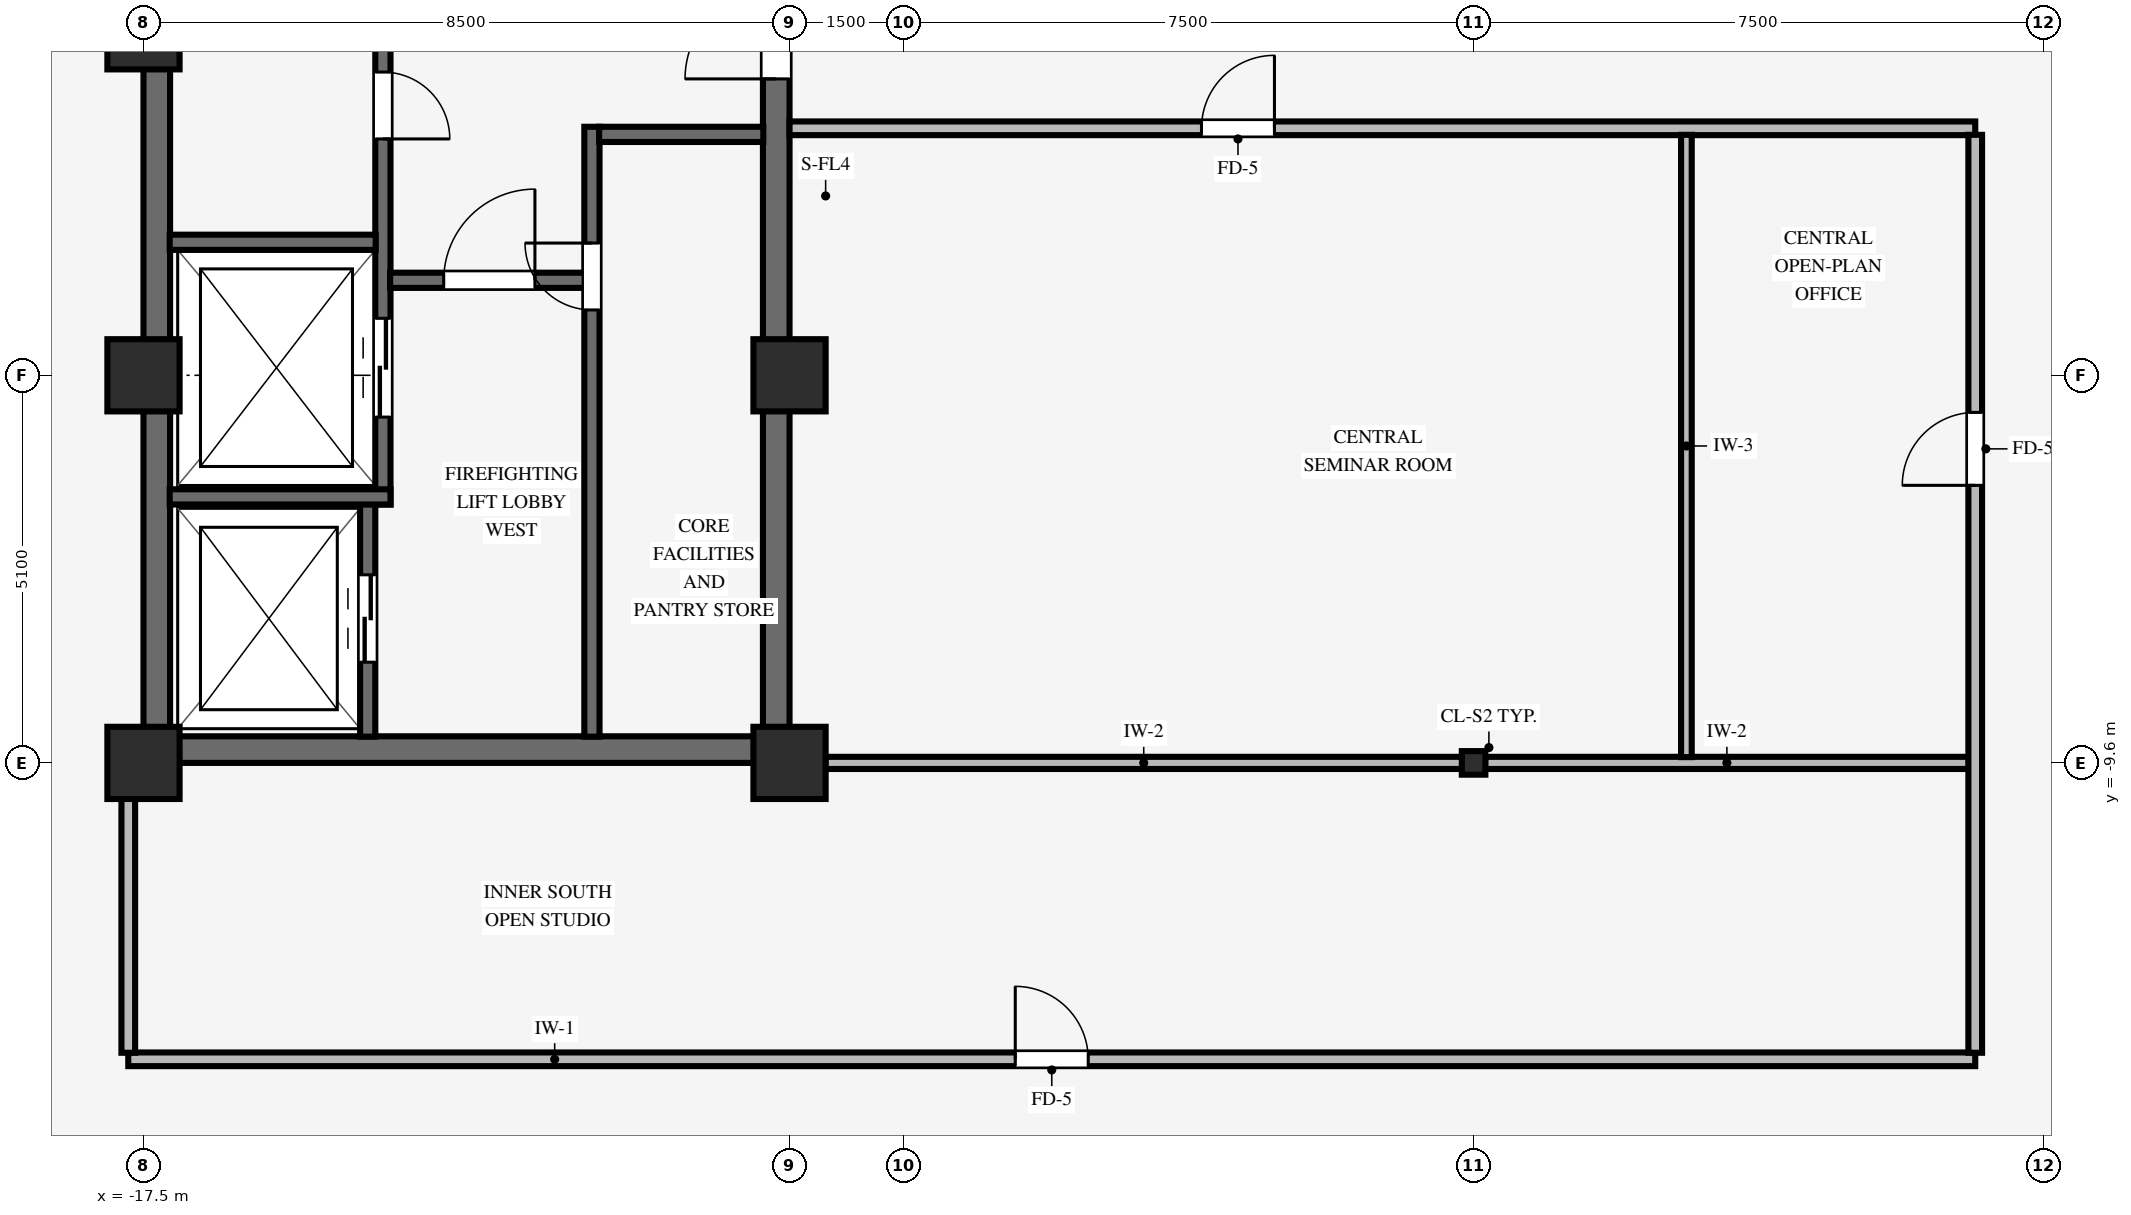
"""IFC4 building model, lengths in metres.
Left out: names, types, materials, properties, quantities, classifications, styles, units other than length and angle.
Written with IfcOpenShell. Run it as: python <this file> out.ifc"""

import sys

from ifc_helpers import new_model, si_unit, direction, frame, frame_2d, origin, origin_2d, place, context, subcontext, project, spatial, rectangle, i_section, extrude, source, transform, mapped, element, fill, save


model = new_model("IFC4")
c1 = context("Model", 3, precision=1e-05, world=origin(), true_north=direction((0.0, 1.0)))
c2 = subcontext(c1, "Body", "Model", "MODEL_VIEW")
j1 = project(units=[si_unit("LENGTHUNIT", "METRE"), si_unit("PLANEANGLEUNIT", "RADIAN")], contexts=[c1])
p1 = place(None, origin())
s1 = spatial("IfcSite", under=j1, at=p1, CompositionType="ELEMENT")
p2 = place(p1, origin())
s2 = spatial("IfcBuilding", under=s1, at=p2, CompositionType="ELEMENT")
p3 = place(p2, frame((0.0, 0.0, 198.2)))
s3 = spatial("IfcBuildingStorey", under=s2, at=p3, CompositionType="ELEMENT", Elevation=198.2)
p4 = place(p3, frame((-17.5, -9.425, 0.0), z_axis=(0.0, 0.0, 1.0), x_axis=(1.0, 0.0, 0.0)))
e1 = element("IfcWall", 1, at=p4, inside=s3, PredefinedType="SHEAR", context=c2, shape_type="SweptSolid", body=[
    extrude(rectangle(XDim=8.5, YDim=0.35, at=frame_2d((4.25, 0.0))), origin(), (0.0, 0.0, 1.0), 3.37),
])
p5 = place(p3, frame((-17.325, -9.255, 0.0), z_axis=(0.0, 0.0, 1.0), x_axis=(0.0, 1.0, 0.0)))
e2 = element("IfcWall", 2, at=p5, inside=s3, PredefinedType="SHEAR", context=c2, shape_type="SweptSolid", body=[
    extrude(rectangle(XDim=18.51, YDim=0.35, at=frame_2d((9.255, 0.0))), origin(), (0.0, 0.0, 1.0), 3.37),
])
p6 = place(p3, frame((-9.175, -9.255, 0.0), z_axis=(0.0, 0.0, 1.0), x_axis=(0.0, 1.0, 0.0)))
e3 = element("IfcWall", 3, at=p6, inside=s3, PredefinedType="SHEAR", context=c2, shape_type="SweptSolid", body=[
    extrude(rectangle(XDim=18.51, YDim=0.35, at=frame_2d((9.255, 0.0))), origin(), (0.0, 0.0, 1.0), 3.37),
])
p7 = place(p6, frame((8.655, 0.0, 0.0)))
e4 = element("IfcOpeningElement", 4, at=p7, cuts=e3, PredefinedType="OPENING", context=c2, shape_type="SweptSolid", body=[
    extrude(rectangle(XDim=1.2, YDim=2.15, at=frame_2d((0.6, 1.075))), frame((0.0, 0.185, 0.0), z_axis=(0.0, -1.0, 0.0), x_axis=(1.0, 0.0, 0.0)), (0.0, 0.0, 1.0), 0.37),
])
for number, where, z_axis, x_axis in (
    (5, (-17.5, -9.6, 0.0), (0.0, 0.0, 1.0), (1.0, 0.0, 0.0)),
    (6, (-17.5, -4.5, 0.0), (0.0, 0.0, 1.0), (1.0, 0.0, 0.0)),
    (7, (-9.0, -9.6, 0.0), (0.0, 0.0, 1.0), (1.0, 0.0, 0.0)),
    (8, (-9.0, -4.5, 0.0), (0.0, 0.0, 1.0), (1.0, 0.0, 0.0)),
    (9, (-17.5, 0.0, 0.0), (0.0, 0.0, 1.0), (1.0, 0.0, 0.0)),
):
    element("IfcColumn", number, at=place(p3, frame(where, z_axis=z_axis, x_axis=x_axis)), inside=s3, PredefinedType="COLUMN", context=c2, shape_type="SweptSolid", body=[
        extrude(rectangle(XDim=0.95, YDim=0.95, at=origin_2d()), origin(), (0.0, 0.0, 1.0), 3.37),
    ])
p8 = place(p3, frame((0.0, -9.6, 0.0), z_axis=(0.0, 0.0, 1.0), x_axis=(1.0, 0.0, 0.0)))
e10 = element("IfcColumn", 10, at=p8, inside=s3, PredefinedType="COLUMN", context=c2, shape_type="SweptSolid", body=[
    extrude(i_section(OverallWidth=0.31, OverallDepth=0.31, WebThickness=0.015, FlangeThickness=0.015, FilletRadius=0.015, at=origin_2d()), origin(), (0.0, 0.0, 1.0), 3.37),
])
p9 = place(p3, frame((-14.55, -9.255, 0.0), z_axis=(0.0, 0.0, 1.0), x_axis=(0.0, 1.0, 0.0)))
e11 = element("IfcWall", 11, at=p9, inside=s3, PredefinedType="SHEAR", context=c2, shape_type="SweptSolid", body=[
    extrude(rectangle(XDim=3.06, YDim=0.2, at=frame_2d((1.53, 0.0))), origin(), (0.0, 0.0, 1.0), 3.37),
])
p10 = place(p9, frame((0.98, 0.0, 0.0)))
e12 = element("IfcOpeningElement", 12, at=p10, cuts=e11, PredefinedType="OPENING", context=c2, shape_type="SweptSolid", body=[
    extrude(rectangle(XDim=1.15, YDim=2.15, at=frame_2d((0.575, 1.075))), frame((0.0, 0.11, 0.0), z_axis=(0.0, -1.0, 0.0), x_axis=(1.0, 0.0, 0.0)), (0.0, 0.0, 1.0), 0.22),
])
p11 = place(p3, frame((-14.35, -6.2, 0.0), z_axis=(0.0, 0.0, 1.0), x_axis=(0.0, 1.0, 0.0)))
e13 = element("IfcWall", 13, at=p11, inside=s3, PredefinedType="SHEAR", context=c2, shape_type="SweptSolid", body=[
    extrude(rectangle(XDim=7.105, YDim=0.2, at=frame_2d((3.552, 0.0))), origin(), (0.0, 0.0, 1.0), 3.37),
])
p12 = place(p11, frame((5.69, 0.0, 0.0), z_axis=(0.0, 0.0, 1.0), x_axis=(-1.0, 0.0, 0.0)))
e14 = element("IfcOpeningElement", 14, at=p12, cuts=e13, PredefinedType="OPENING", context=c2, shape_type="SweptSolid", body=[
    extrude(rectangle(XDim=0.88, YDim=2.1, at=frame_2d((0.44, 1.05))), frame((0.0, 0.11, 0.0), z_axis=(0.0, -1.0, 0.0), x_axis=(1.0, 0.0, 0.0)), (0.0, 0.0, 1.0), 0.22),
])
p13 = place(p11, frame((1.15, 0.0, 0.0)))
e15 = element("IfcOpeningElement", 15, at=p13, cuts=e13, PredefinedType="OPENING", context=c2, shape_type="SweptSolid", body=[
    extrude(rectangle(XDim=1.3, YDim=2.2, at=frame_2d((0.65, 1.1))), frame((0.0, 0.11, 0.0), z_axis=(0.0, -1.0, 0.0), x_axis=(1.0, 0.0, 0.0)), (0.0, 0.0, 1.0), 0.22),
])
p14 = place(p3, frame((-17.155, -6.1, 0.0), z_axis=(0.0, 0.0, 1.0), x_axis=(1.0, 0.0, 0.0)))
e16 = element("IfcWall", 16, at=p14, inside=s3, PredefinedType="SHEAR", context=c2, shape_type="SweptSolid", body=[
    extrude(rectangle(XDim=2.905, YDim=0.2, at=frame_2d((1.453, 0.0))), origin(), (0.0, 0.0, 1.0), 3.37),
])
p15 = place(p3, frame((-17.155, -2.75, 0.0), z_axis=(0.0, 0.0, 1.0), x_axis=(1.0, 0.0, 0.0)))
e17 = element("IfcWall", 17, at=p15, inside=s3, PredefinedType="SHEAR", context=c2, shape_type="SweptSolid", body=[
    extrude(rectangle(XDim=2.71, YDim=0.2, at=frame_2d((1.355, 0.0))), origin(), (0.0, 0.0, 1.0), 3.37),
])
p16 = place(p3, frame((-11.6, -9.255, 0.0), z_axis=(0.0, 0.0, 1.0), x_axis=(0.0, 1.0, 0.0)))
e18 = element("IfcWall", 18, at=p16, inside=s3, PredefinedType="SHEAR", context=c2, shape_type="SweptSolid", body=[
    extrude(rectangle(XDim=8.025, YDim=0.2, at=frame_2d((4.012, 0.0))), origin(), (0.0, 0.0, 1.0), 3.37),
])
p17 = place(p16, frame((5.615, 0.0, 0.0)))
e19 = element("IfcOpeningElement", 19, at=p17, cuts=e18, PredefinedType="OPENING", context=c2, shape_type="SweptSolid", body=[
    extrude(rectangle(XDim=0.88, YDim=2.1, at=frame_2d((0.44, 1.05))), frame((0.0, 0.11, 0.0), z_axis=(0.0, -1.0, 0.0), x_axis=(1.0, 0.0, 0.0)), (0.0, 0.0, 1.0), 0.22),
])
p18 = place(p3, frame((-14.255, -3.25, 0.0), z_axis=(0.0, 0.0, 1.0), x_axis=(1.0, 0.0, 0.0)))
e20 = element("IfcWall", 20, at=p18, inside=s3, PredefinedType="SHEAR", context=c2, shape_type="SweptSolid", body=[
    extrude(rectangle(XDim=2.56, YDim=0.2, at=frame_2d((1.28, 0.0))), origin(), (0.0, 0.0, 1.0), 3.37),
])
p19 = place(p18, frame((0.705, 0.0, 0.0)))
e21 = element("IfcOpeningElement", 21, at=p19, cuts=e20, PredefinedType="OPENING", context=c2, shape_type="SweptSolid", body=[
    extrude(rectangle(XDim=1.2, YDim=2.15, at=frame_2d((0.6, 1.075))), frame((0.0, 0.11, 0.0), z_axis=(0.0, -1.0, 0.0), x_axis=(1.0, 0.0, 0.0)), (0.0, 0.0, 1.0), 0.22),
])
p20 = place(p3, frame((-11.505, -1.33, 0.0), z_axis=(0.0, 0.0, 1.0), x_axis=(1.0, 0.0, 0.0)))
e22 = element("IfcWall", 22, at=p20, inside=s3, PredefinedType="SHEAR", context=c2, shape_type="SweptSolid", body=[
    extrude(rectangle(XDim=2.16, YDim=0.2, at=frame_2d((1.08, 0.0))), origin(), (0.0, 0.0, 1.0), 3.37),
])
p21 = place(p3, frame((-17.7, -13.5, 0.0), z_axis=(0.0, 0.0, 1.0), x_axis=(1.0, 0.0, 0.0)))
e23 = element("IfcWall", 23, at=p21, inside=s3, PredefinedType="PARTITIONING", context=c2, shape_type="SweptSolid", body=[
    extrude(rectangle(XDim=24.3, YDim=0.18, at=frame_2d((12.15, 0.0))), origin(), (0.0, 0.0, 1.0), 3.008),
])
p22 = place(p21, frame((11.67, 0.0, 0.0)))
e24 = element("IfcOpeningElement", 24, at=p22, cuts=e23, PredefinedType="OPENING", context=c2, shape_type="SweptSolid", body=[
    extrude(rectangle(XDim=0.96, YDim=2.1, at=frame_2d((0.48, 1.05))), frame((0.0, 0.1, 0.0), z_axis=(0.0, -1.0, 0.0), x_axis=(1.0, 0.0, 0.0)), (0.0, 0.0, 1.0), 0.2),
])
p23 = place(p3, frame((-8.529, -9.6, 0.0), z_axis=(0.0, 0.0, 1.0), x_axis=(1.0, 0.0, 0.0)))
e25 = element("IfcWall", 25, at=p23, inside=s3, PredefinedType="PARTITIONING", context=c2, shape_type="SweptSolid", body=[
    extrude(rectangle(XDim=8.378, YDim=0.16, at=frame_2d((4.189, 0.0))), origin(), (0.0, 0.0, 1.0), 2.405),
])
p24 = place(p3, frame((0.151, -9.6, 0.0), z_axis=(0.0, 0.0, 1.0), x_axis=(1.0, 0.0, 0.0)))
e26 = element("IfcWall", 26, at=p24, inside=s3, PredefinedType="PARTITIONING", context=c2, shape_type="SweptSolid", body=[
    extrude(rectangle(XDim=6.363, YDim=0.16, at=frame_2d((3.182, 0.0))), origin(), (0.0, 0.0, 1.0), 2.405),
])
p25 = place(p3, frame((-9.0, -1.25, 0.0), z_axis=(0.0, 0.0, 1.0), x_axis=(1.0, 0.0, 0.0)))
e27 = element("IfcWall", 27, at=p25, inside=s3, PredefinedType="PARTITIONING", context=c2, shape_type="SweptSolid", body=[
    extrude(rectangle(XDim=15.6, YDim=0.18, at=frame_2d((7.8, 0.0))), origin(), (0.0, 0.0, 1.0), 3.36),
])
p26 = place(p25, frame((5.42, 0.0, 0.0)))
e28 = element("IfcOpeningElement", 28, at=p26, cuts=e27, PredefinedType="OPENING", context=c2, shape_type="SweptSolid", body=[
    extrude(rectangle(XDim=0.96, YDim=2.1, at=frame_2d((0.48, 1.05))), frame((0.0, 0.1, 0.0), z_axis=(0.0, -1.0, 0.0), x_axis=(1.0, 0.0, 0.0)), (0.0, 0.0, 1.0), 0.2),
])
p27 = place(p3, frame((-17.7, -13.414, 0.0), z_axis=(0.0, 0.0, 1.0), x_axis=(0.0, 1.0, 0.0)))
e29 = element("IfcWall", 29, at=p27, inside=s3, PredefinedType="PARTITIONING", context=c2, shape_type="SweptSolid", body=[
    extrude(rectangle(XDim=3.343, YDim=0.18, at=frame_2d((1.671, 0.0))), origin(), (0.0, 0.0, 1.0), 2.816),
])
p28 = place(p3, frame((2.8, -9.524, 0.0), z_axis=(0.0, 0.0, 1.0), x_axis=(0.0, 1.0, 0.0)))
e30 = element("IfcWall", 30, at=p28, inside=s3, PredefinedType="PARTITIONING", context=c2, shape_type="SweptSolid", body=[
    extrude(rectangle(XDim=8.188, YDim=0.14, at=frame_2d((4.094, 0.0))), origin(), (0.0, 0.0, 1.0), 3.36),
])
p29 = place(p3, frame((6.6, -13.414, 0.0), z_axis=(0.0, 0.0, 1.0), x_axis=(0.0, 1.0, 0.0)))
e31 = element("IfcWall", 31, at=p29, inside=s3, PredefinedType="PARTITIONING", context=c2, shape_type="SweptSolid", body=[
    extrude(rectangle(XDim=12.078, YDim=0.18, at=frame_2d((6.039, 0.0))), origin(), (0.0, 0.0, 1.0), 3.36),
])
p30 = place(p29, frame((7.466, 0.0, 0.0)))
e32 = element("IfcOpeningElement", 32, at=p30, cuts=e31, PredefinedType="OPENING", context=c2, shape_type="SweptSolid", body=[
    extrude(rectangle(XDim=0.96, YDim=2.1, at=frame_2d((0.48, 1.05))), frame((0.0, 0.1, 0.0), z_axis=(0.0, -1.0, 0.0), x_axis=(1.0, 0.0, 0.0)), (0.0, 0.0, 1.0), 0.2),
])
m1 = source(origin(), c2, "Body", "SweptSolid", [
    extrude(rectangle(XDim=0.88, YDim=2.1, at=frame_2d((0.44, 1.05))), frame((0.0, 0.025, 0.0), z_axis=(0.0, -1.0, 0.0), x_axis=(1.0, 0.0, 0.0)), (0.0, 0.0, 1.0), 0.05),
])
p31 = place(p12, origin())
e33 = element("IfcDoor", 33, at=p31, inside=s3, OperationType="SINGLE_SWING_RIGHT", PredefinedType="DOOR", context=c2, shape_type="MappedRepresentation", body=[
    mapped(m1, transform((0.0, 0.0, 0.0), scale=1.0)),
])
fill(e14, e33)
m2 = source(origin(), c2, "Body", "SweptSolid", [
    extrude(rectangle(XDim=1.2, YDim=2.15, at=frame_2d((0.6, 1.075))), frame((0.0, 0.025, 0.0), z_axis=(0.0, -1.0, 0.0), x_axis=(1.0, 0.0, 0.0)), (0.0, 0.0, 1.0), 0.05),
])
p32 = place(p19, origin())
e34 = element("IfcDoor", 34, at=p32, inside=s3, OperationType="SINGLE_SWING_RIGHT", PredefinedType="DOOR", context=c2, shape_type="MappedRepresentation", body=[
    mapped(m2, transform((0.0, 0.0, 0.0), scale=1.0)),
])
fill(e21, e34)
p33 = place(p17, origin())
e35 = element("IfcDoor", 35, at=p33, inside=s3, OperationType="SINGLE_SWING_RIGHT", PredefinedType="DOOR", context=c2, shape_type="MappedRepresentation", body=[
    mapped(m1, transform((0.0, 0.0, 0.0), scale=1.0)),
])
fill(e19, e35)
p34 = place(p7, origin())
e36 = element("IfcDoor", 36, at=p34, inside=s3, OperationType="SINGLE_SWING_LEFT", PredefinedType="DOOR", context=c2, shape_type="MappedRepresentation", body=[
    mapped(m2, transform((0.0, 0.0, 0.0), scale=1.0)),
])
fill(e4, e36)
m3 = source(origin(), c2, "Body", "SweptSolid", [
    extrude(rectangle(XDim=1.15, YDim=2.15, at=frame_2d((0.575, 1.075))), frame((0.0, 0.025, 0.0), z_axis=(0.0, -1.0, 0.0), x_axis=(1.0, 0.0, 0.0)), (0.0, 0.0, 1.0), 0.05),
])
p35 = place(p10, origin())
e37 = element("IfcDoor", 37, at=p35, inside=s3, OperationType="DOUBLE_DOOR_SLIDING", PredefinedType="DOOR", context=c2, shape_type="MappedRepresentation", body=[
    mapped(m3, transform((0.0, 0.0, 0.0), scale=1.0)),
])
fill(e12, e37)
m4 = source(origin(), c2, "Body", "SweptSolid", [
    extrude(rectangle(XDim=1.3, YDim=2.2, at=frame_2d((0.65, 1.1))), frame((0.0, 0.025, 0.0), z_axis=(0.0, -1.0, 0.0), x_axis=(1.0, 0.0, 0.0)), (0.0, 0.0, 1.0), 0.05),
])
p36 = place(p13, origin())
e38 = element("IfcDoor", 38, at=p36, inside=s3, OperationType="DOUBLE_DOOR_SLIDING", PredefinedType="DOOR", context=c2, shape_type="MappedRepresentation", body=[
    mapped(m4, transform((0.0, 0.0, 0.0), scale=1.0)),
])
fill(e15, e38)
m5 = source(origin(), c2, "Body", "SweptSolid", [
    extrude(rectangle(XDim=0.96, YDim=2.1, at=frame_2d((0.48, 1.05))), frame((0.0, 0.025, 0.0), z_axis=(0.0, -1.0, 0.0), x_axis=(1.0, 0.0, 0.0)), (0.0, 0.0, 1.0), 0.05),
])
p37 = place(p22, origin())
e39 = element("IfcDoor", 39, at=p37, inside=s3, OperationType="SINGLE_SWING_LEFT", PredefinedType="DOOR", context=c2, shape_type="MappedRepresentation", body=[
    mapped(m5, transform((0.0, 0.0, 0.0), scale=1.0)),
])
fill(e24, e39)
p38 = place(p26, origin())
e40 = element("IfcDoor", 40, at=p38, inside=s3, OperationType="SINGLE_SWING_RIGHT", PredefinedType="DOOR", context=c2, shape_type="MappedRepresentation", body=[
    mapped(m5, transform((0.0, 0.0, 0.0), scale=1.0)),
])
fill(e28, e40)
p39 = place(p30, origin())
e41 = element("IfcDoor", 41, at=p39, inside=s3, OperationType="SINGLE_SWING_LEFT", PredefinedType="DOOR", context=c2, shape_type="MappedRepresentation", body=[
    mapped(m5, transform((0.0, 0.0, 0.0), scale=1.0)),
])
fill(e32, e41)
save(model, sys.argv[1])
